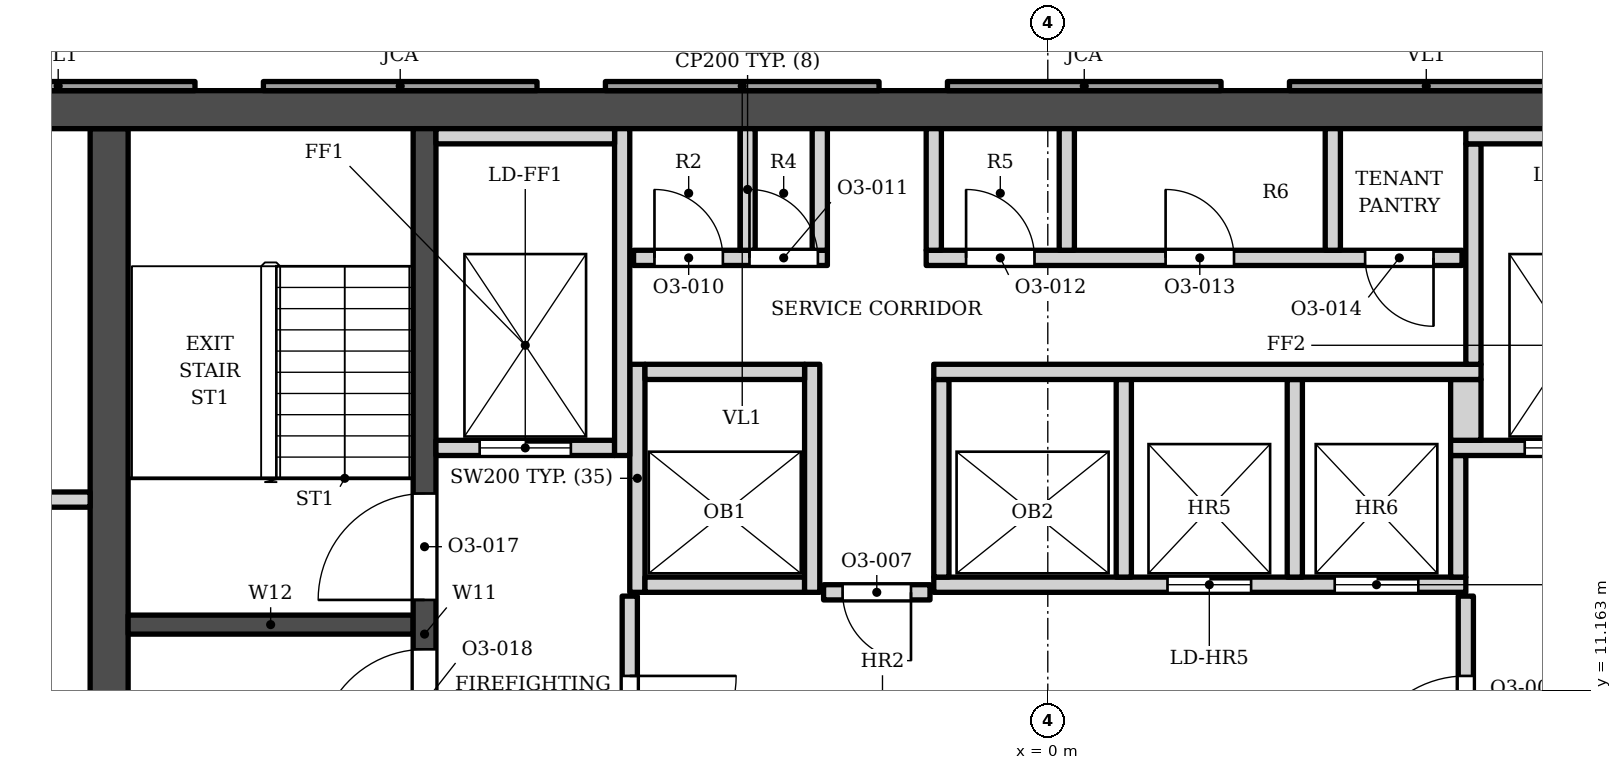
"""IFC4 building model, lengths in metres.
Left out: names, types, materials, properties, quantities, classifications, styles, units other than length and angle.
Written with IfcOpenShell. Run it as: python <this file> out.ifc"""

import sys

from ifc_helpers import new_model, si_unit, direction, frame, frame_2d, origin, place, context, subcontext, project, spatial, polyline, rectangle, outline, extrude, element, fill, save


model = new_model("IFC4")
c1 = context("Model", 3, precision=1e-05, world=origin(), true_north=direction((0.0, 1.0)))
c2 = subcontext(c1, "Body", "Model", "MODEL_VIEW")
j1 = project(units=[si_unit("LENGTHUNIT", "METRE"), si_unit("PLANEANGLEUNIT", "RADIAN")], contexts=[c1])
p1 = place(None, origin())
s1 = spatial("IfcSite", under=j1, at=p1, CompositionType="ELEMENT")
p2 = place(p1, origin())
s2 = spatial("IfcBuilding", under=s1, at=p2, CompositionType="ELEMENT")
p3 = place(p2, frame((0.0, 0.0, 168.0)))
s3 = spatial("IfcBuildingStorey", under=s2, at=p3, CompositionType="ELEMENT", Elevation=168.0)
p4 = place(p3, frame((-15.1, 18.802, 0.0), z_axis=(0.0, 0.0, 1.0), x_axis=(1.0, 0.0, 0.0)))
e1 = element("IfcWall", 1, at=p4, inside=s3, PredefinedType="SHEAR", context=c2, shape_type="SweptSolid", body=[
    extrude(rectangle(XDim=30.2, YDim=0.5, at=frame_2d((15.1, 0.0))), origin(), (0.0, 0.0, 1.0), 3.9),
])
p5 = place(p3, frame((-12.35, 5.253, 0.0), z_axis=(0.0, 0.0, 1.0), x_axis=(0.0, 1.0, 0.0)))
e2 = element("IfcWall", 2, at=p5, inside=s3, PredefinedType="SHEAR", context=c2, shape_type="SweptSolid", body=[
    extrude(rectangle(XDim=13.3, YDim=0.5, at=frame_2d((6.65, 0.0))), origin(), (0.0, 0.0, 1.0), 3.9),
])
p6 = place(p3, frame((-8.2, 5.253, 0.0), z_axis=(0.0, 0.0, 1.0), x_axis=(0.0, 1.0, 0.0)))
e3 = element("IfcWall", 3, at=p6, inside=s3, PredefinedType="SHEAR", context=c2, shape_type="SweptSolid", body=[
    extrude(rectangle(XDim=13.3, YDim=0.3, at=frame_2d((6.65, 0.0))), origin(), (0.0, 0.0, 1.0), 3.9),
])
p7 = place(p6, frame((7.1, 0.0, 0.0)))
e4 = element("IfcOpeningElement", 4, at=p7, cuts=e3, PredefinedType="OPENING", context=c2, shape_type="SweptSolid", body=[
    extrude(rectangle(XDim=1.4, YDim=2.1, at=frame_2d((0.7, 1.05))), frame((0.0, 0.16, 0.0), z_axis=(0.0, -1.0, 0.0), x_axis=(1.0, 0.0, 0.0)), (0.0, 0.0, 1.0), 0.32),
])
p8 = place(p6, frame((5.05, 0.0, 0.0)))
e5 = element("IfcOpeningElement", 5, at=p8, cuts=e3, PredefinedType="OPENING", context=c2, shape_type="SweptSolid", body=[
    extrude(rectangle(XDim=1.4, YDim=2.1, at=frame_2d((0.7, 1.05))), frame((0.0, 0.16, 0.0), z_axis=(0.0, -1.0, 0.0), x_axis=(1.0, 0.0, 0.0)), (0.0, 0.0, 1.0), 0.32),
])
p9 = place(p3, frame((-12.1, 12.028, 0.0), z_axis=(0.0, 0.0, 1.0), x_axis=(1.0, 0.0, 0.0)))
e6 = element("IfcWall", 6, at=p9, inside=s3, PredefinedType="SHEAR", context=c2, shape_type="SweptSolid", body=[
    extrude(rectangle(XDim=3.75, YDim=0.25, at=frame_2d((1.875, 0.0))), origin(), (0.0, 0.0, 1.0), 3.9),
])
p10 = place(p3, origin())
e7 = element("IfcWall", 7, at=p10, inside=s3, PredefinedType="ELEMENTEDWALL", context=c2, shape_type="SweptSolid", body=[
    extrude(outline(polyline([(3.18, 19.173), (3.18, 19.052), (6.78, 19.052), (6.78, 19.173), (3.18, 19.173)])), origin(), (0.0, 0.0, 1.0), 3.0),
])
p11 = place(p3, origin())
e8 = element("IfcWall", 8, at=p11, inside=s3, PredefinedType="SOLIDWALL", context=c2, shape_type="SweptSolid", body=[
    extrude(outline(polyline([(-1.32, 19.173), (-1.32, 19.052), (2.28, 19.052), (2.28, 19.173), (-1.32, 19.173)])), origin(), (0.0, 0.0, 1.0), 3.0),
])
p12 = place(p3, origin())
e9 = element("IfcWall", 9, at=p12, inside=s3, PredefinedType="ELEMENTEDWALL", context=c2, shape_type="SweptSolid", body=[
    extrude(outline(polyline([(-5.82, 19.173), (-5.82, 19.052), (-2.22, 19.052), (-2.22, 19.173), (-5.82, 19.173)])), origin(), (0.0, 0.0, 1.0), 3.0),
])
p13 = place(p3, origin())
e10 = element("IfcWall", 10, at=p13, inside=s3, PredefinedType="SOLIDWALL", context=c2, shape_type="SweptSolid", body=[
    extrude(outline(polyline([(-10.32, 19.173), (-10.32, 19.052), (-6.72, 19.052), (-6.72, 19.173), (-10.32, 19.173)])), origin(), (0.0, 0.0, 1.0), 3.0),
])
p14 = place(p3, origin())
e11 = element("IfcWall", 11, at=p14, inside=s3, PredefinedType="ELEMENTEDWALL", context=c2, shape_type="SweptSolid", body=[
    extrude(outline(polyline([(-14.82, 19.173), (-14.82, 19.052), (-11.22, 19.052), (-11.22, 19.173), (-14.82, 19.173)])), origin(), (0.0, 0.0, 1.0), 3.0),
])
p15 = place(p3, frame((-5.5, 9.103, 0.0), z_axis=(0.0, 0.0, 1.0), x_axis=(0.0, 1.0, 0.0)))
e12 = element("IfcWall", 12, at=p15, inside=s3, PredefinedType="SOLIDWALL", context=c2, shape_type="SweptSolid", body=[
    extrude(rectangle(XDim=3.3, YDim=0.2, at=frame_2d((1.65, 0.0))), origin(), (0.0, 0.0, 1.0), 3.73),
])
p16 = place(p15, frame((0.85, 0.0, 0.0)))
e13 = element("IfcOpeningElement", 13, at=p16, cuts=e12, PredefinedType="OPENING", context=c2, shape_type="SweptSolid", body=[
    extrude(rectangle(XDim=1.4, YDim=2.1, at=frame_2d((0.7, 1.05))), frame((0.0, 0.11, 0.0), z_axis=(0.0, -1.0, 0.0), x_axis=(1.0, 0.0, 0.0)), (0.0, 0.0, 1.0), 0.22),
])
p17 = place(p3, frame((5.5, 9.103, 0.0), z_axis=(0.0, 0.0, 1.0), x_axis=(0.0, 1.0, 0.0)))
e14 = element("IfcWall", 14, at=p17, inside=s3, PredefinedType="SOLIDWALL", context=c2, shape_type="SweptSolid", body=[
    extrude(rectangle(XDim=3.3, YDim=0.2, at=frame_2d((1.65, 0.0))), origin(), (0.0, 0.0, 1.0), 3.73),
])
p18 = place(p17, frame((0.85, 0.0, 0.0)))
e15 = element("IfcOpeningElement", 15, at=p18, cuts=e14, PredefinedType="OPENING", context=c2, shape_type="SweptSolid", body=[
    extrude(rectangle(XDim=1.4, YDim=2.1, at=frame_2d((0.7, 1.05))), frame((0.0, 0.11, 0.0), z_axis=(0.0, -1.0, 0.0), x_axis=(1.0, 0.0, 0.0)), (0.0, 0.0, 1.0), 0.22),
])
p19 = place(p3, frame((-2.95, 12.453, 0.0), z_axis=(0.0, 0.0, 1.0), x_axis=(1.0, 0.0, 0.0)))
e16 = element("IfcWall", 16, at=p19, inside=s3, PredefinedType="SOLIDWALL", context=c2, shape_type="SweptSolid", body=[
    extrude(rectangle(XDim=1.4, YDim=0.2, at=frame_2d((0.7, 0.0))), origin(), (0.0, 0.0, 1.0), 3.73),
])
p20 = place(p19, frame((0.25, 0.0, 0.0)))
e17 = element("IfcOpeningElement", 17, at=p20, cuts=e16, PredefinedType="OPENING", context=c2, shape_type="SweptSolid", body=[
    extrude(rectangle(XDim=0.9, YDim=2.1, at=frame_2d((0.45, 1.05))), frame((0.0, 0.11, 0.0), z_axis=(0.0, -1.0, 0.0), x_axis=(1.0, 0.0, 0.0)), (0.0, 0.0, 1.0), 0.22),
])
p21 = place(p3, frame((-5.4, 12.453, 0.0), z_axis=(0.0, 0.0, 1.0), x_axis=(0.0, 1.0, 0.0)))
e18 = element("IfcWall", 18, at=p21, inside=s3, PredefinedType="SOLIDWALL", context=c2, shape_type="SweptSolid", body=[
    extrude(rectangle(XDim=3.0, YDim=0.2, at=frame_2d((1.5, 0.0))), origin(), (0.0, 0.0, 1.0), 3.73),
])
p22 = place(p3, frame((-5.3, 12.552, 0.0), z_axis=(0.0, 0.0, 1.0), x_axis=(1.0, 0.0, 0.0)))
e19 = element("IfcWall", 19, at=p22, inside=s3, PredefinedType="SOLIDWALL", context=c2, shape_type="SweptSolid", body=[
    extrude(rectangle(XDim=2.1, YDim=0.2, at=frame_2d((1.05, 0.0))), origin(), (0.0, 0.0, 1.0), 3.73),
])
p23 = place(p3, frame((-3.1, 12.453, 0.0), z_axis=(0.0, 0.0, 1.0), x_axis=(0.0, 1.0, 0.0)))
e20 = element("IfcWall", 20, at=p23, inside=s3, PredefinedType="SOLIDWALL", context=c2, shape_type="SweptSolid", body=[
    extrude(rectangle(XDim=3.0, YDim=0.2, at=frame_2d((1.5, 0.0))), origin(), (0.0, 0.0, 1.0), 3.73),
])
p24 = place(p3, frame((-1.5, 12.552, 0.0), z_axis=(0.0, 0.0, 1.0), x_axis=(1.0, 0.0, 0.0)))
e21 = element("IfcWall", 21, at=p24, inside=s3, PredefinedType="SOLIDWALL", context=c2, shape_type="SweptSolid", body=[
    extrude(rectangle(XDim=7.0, YDim=0.2, at=frame_2d((3.5, 0.0))), origin(), (0.0, 0.0, 1.0), 3.73),
])
p25 = place(p24, frame((3.075, 0.0, 0.0)))
e22 = element("IfcOpeningElement", 22, at=p25, cuts=e21, PredefinedType="OPENING", context=c2, shape_type="SweptSolid", body=[
    extrude(rectangle(XDim=1.1, YDim=2.1, at=frame_2d((0.55, 1.05))), frame((0.0, 0.11, 0.0), z_axis=(0.0, -1.0, 0.0), x_axis=(1.0, 0.0, 0.0)), (0.0, 0.0, 1.0), 0.22),
])
p26 = place(p24, frame((5.275, 0.0, 0.0)))
e23 = element("IfcOpeningElement", 23, at=p26, cuts=e21, PredefinedType="OPENING", context=c2, shape_type="SweptSolid", body=[
    extrude(rectangle(XDim=1.1, YDim=2.1, at=frame_2d((0.55, 1.05))), frame((0.0, 0.11, 0.0), z_axis=(0.0, -1.0, 0.0), x_axis=(1.0, 0.0, 0.0)), (0.0, 0.0, 1.0), 0.22),
])
for number, where, z_axis, x_axis in (
    (24, (-1.4, 12.653, 0.0), (0.0, 0.0, 1.0), (0.0, 1.0, 0.0)),
    (25, (1.0, 12.653, 0.0), (0.0, 0.0, 1.0), (0.0, 1.0, 0.0)),
    (26, (3.25, 12.653, 0.0), (0.0, 0.0, 1.0), (0.0, 1.0, 0.0)),
):
    element("IfcWall", number, at=place(p3, frame(where, z_axis=z_axis, x_axis=x_axis)), inside=s3, PredefinedType="SOLIDWALL", context=c2, shape_type="SweptSolid", body=[
        extrude(rectangle(XDim=2.6, YDim=0.2, at=frame_2d((1.3, 0.0))), origin(), (0.0, 0.0, 1.0), 3.73),
    ])
p27 = place(p3, frame((5.4, 12.653, 0.0), z_axis=(0.0, 0.0, 1.0), x_axis=(0.0, 1.0, 0.0)))
e27 = element("IfcWall", 27, at=p27, inside=s3, PredefinedType="SOLIDWALL", context=c2, shape_type="SweptSolid", body=[
    extrude(rectangle(XDim=1.6, YDim=0.2, at=frame_2d((0.8, 0.0))), origin(), (0.0, 0.0, 1.0), 3.73),
])
p28 = place(p3, frame((-15.1, 13.673, 0.0), z_axis=(0.0, 0.0, 1.0), x_axis=(1.0, 0.0, 0.0)))
e28 = element("IfcWall", 28, at=p28, inside=s3, PredefinedType="PARTITIONING", context=c2, shape_type="SweptSolid", body=[
    extrude(rectangle(XDim=2.5, YDim=0.2, at=frame_2d((1.25, 0.0))), origin(), (0.0, 0.0, 1.0), 3.73),
])
p29 = place(p3, frame((-8.05, 14.353, 0.0), z_axis=(0.0, 0.0, 1.0), x_axis=(1.0, 0.0, 0.0)))
e29 = element("IfcWall", 29, at=p29, inside=s3, PredefinedType="SOLIDWALL", context=c2, shape_type="SweptSolid", body=[
    extrude(rectangle(XDim=2.35, YDim=0.2, at=frame_2d((1.175, 0.0))), origin(), (0.0, 0.0, 1.0), 3.73),
])
p30 = place(p29, frame((0.575, 0.0, 0.0)))
e30 = element("IfcOpeningElement", 30, at=p30, cuts=e29, PredefinedType="OPENING", context=c2, shape_type="SweptSolid", body=[
    extrude(rectangle(XDim=1.2, YDim=2.1, at=frame_2d((0.6, 1.05))), frame((0.0, 0.11, 0.0), z_axis=(0.0, -1.0, 0.0), x_axis=(1.0, 0.0, 0.0)), (0.0, 0.0, 1.0), 0.22),
])
p31 = place(p3, frame((-5.6, 14.253, 0.0), z_axis=(0.0, 0.0, 1.0), x_axis=(0.0, 1.0, 0.0)))
e31 = element("IfcWall", 31, at=p31, inside=s3, PredefinedType="SOLIDWALL", context=c2, shape_type="SweptSolid", body=[
    extrude(rectangle(XDim=4.3, YDim=0.2, at=frame_2d((2.15, 0.0))), origin(), (0.0, 0.0, 1.0), 3.73),
])
p32 = place(p3, frame((5.3, 14.353, 0.0), z_axis=(0.0, 0.0, 1.0), x_axis=(1.0, 0.0, 0.0)))
e32 = element("IfcWall", 32, at=p32, inside=s3, PredefinedType="SOLIDWALL", context=c2, shape_type="SweptSolid", body=[
    extrude(rectangle(XDim=2.75, YDim=0.2, at=frame_2d((1.375, 0.0))), origin(), (0.0, 0.0, 1.0), 3.73),
])
p33 = place(p32, frame((0.975, 0.0, 0.0)))
e33 = element("IfcOpeningElement", 33, at=p33, cuts=e32, PredefinedType="OPENING", context=c2, shape_type="SweptSolid", body=[
    extrude(rectangle(XDim=1.2, YDim=2.1, at=frame_2d((0.6, 1.05))), frame((0.0, 0.11, 0.0), z_axis=(0.0, -1.0, 0.0), x_axis=(1.0, 0.0, 0.0)), (0.0, 0.0, 1.0), 0.22),
])
p34 = place(p3, frame((5.5, 14.453, 0.0), z_axis=(0.0, 0.0, 1.0), x_axis=(0.0, 1.0, 0.0)))
e34 = element("IfcWall", 34, at=p34, inside=s3, PredefinedType="SOLIDWALL", context=c2, shape_type="SweptSolid", body=[
    extrude(rectangle(XDim=0.8, YDim=0.4, at=frame_2d((0.4, 0.0))), origin(), (0.0, 0.0, 1.0), 3.73),
])
p35 = place(p3, frame((-5.3, 15.353, 0.0), z_axis=(0.0, 0.0, 1.0), x_axis=(1.0, 0.0, 0.0)))
e35 = element("IfcWall", 35, at=p35, inside=s3, PredefinedType="SOLIDWALL", context=c2, shape_type="SweptSolid", body=[
    extrude(rectangle(XDim=2.1, YDim=0.2, at=frame_2d((1.05, 0.0))), origin(), (0.0, 0.0, 1.0), 3.73),
])
p36 = place(p3, frame((-1.5, 15.353, 0.0), z_axis=(0.0, 0.0, 1.0), x_axis=(1.0, 0.0, 0.0)))
e36 = element("IfcWall", 36, at=p36, inside=s3, PredefinedType="SOLIDWALL", context=c2, shape_type="SweptSolid", body=[
    extrude(rectangle(XDim=7.2, YDim=0.2, at=frame_2d((3.6, 0.0))), origin(), (0.0, 0.0, 1.0), 3.73),
])
p37 = place(p3, frame((5.6, 15.453, 0.0), z_axis=(0.0, 0.0, 1.0), x_axis=(0.0, 1.0, 0.0)))
e37 = element("IfcWall", 37, at=p37, inside=s3, PredefinedType="SOLIDWALL", context=c2, shape_type="SweptSolid", body=[
    extrude(rectangle(XDim=2.9, YDim=0.2, at=frame_2d((1.45, 0.0))), origin(), (0.0, 0.0, 1.0), 3.73),
])
p38 = place(p3, frame((-5.45, 16.853, 0.0), z_axis=(0.0, 0.0, 1.0), x_axis=(1.0, 0.0, 0.0)))
e38 = element("IfcWall", 38, at=p38, inside=s3, PredefinedType="SOLIDWALL", context=c2, shape_type="SweptSolid", body=[
    extrude(rectangle(XDim=2.55, YDim=0.2, at=frame_2d((1.275, 0.0))), origin(), (0.0, 0.0, 1.0), 3.73),
])
p39 = place(p38, frame((0.275, 0.0, 0.0)))
e39 = element("IfcOpeningElement", 39, at=p39, cuts=e38, PredefinedType="OPENING", context=c2, shape_type="SweptSolid", body=[
    extrude(rectangle(XDim=0.9, YDim=2.1, at=frame_2d((0.45, 1.05))), frame((0.0, 0.11, 0.0), z_axis=(0.0, -1.0, 0.0), x_axis=(1.0, 0.0, 0.0)), (0.0, 0.0, 1.0), 0.22),
])
p40 = place(p38, frame((1.525, 0.0, 0.0)))
e40 = element("IfcOpeningElement", 40, at=p40, cuts=e38, PredefinedType="OPENING", context=c2, shape_type="SweptSolid", body=[
    extrude(rectangle(XDim=0.9, YDim=2.1, at=frame_2d((0.45, 1.05))), frame((0.0, 0.11, 0.0), z_axis=(0.0, -1.0, 0.0), x_axis=(1.0, 0.0, 0.0)), (0.0, 0.0, 1.0), 0.22),
])
p41 = place(p3, frame((-1.6, 16.853, 0.0), z_axis=(0.0, 0.0, 1.0), x_axis=(1.0, 0.0, 0.0)))
e41 = element("IfcWall", 41, at=p41, inside=s3, PredefinedType="SOLIDWALL", context=c2, shape_type="SweptSolid", body=[
    extrude(rectangle(XDim=7.05, YDim=0.2, at=frame_2d((3.525, 0.0))), origin(), (0.0, 0.0, 1.0), 3.73),
])
p42 = place(p41, frame((0.525, 0.0, 0.0)))
e42 = element("IfcOpeningElement", 42, at=p42, cuts=e41, PredefinedType="OPENING", context=c2, shape_type="SweptSolid", body=[
    extrude(rectangle(XDim=0.9, YDim=2.1, at=frame_2d((0.45, 1.05))), frame((0.0, 0.11, 0.0), z_axis=(0.0, -1.0, 0.0), x_axis=(1.0, 0.0, 0.0)), (0.0, 0.0, 1.0), 0.22),
])
p43 = place(p41, frame((3.15, 0.0, 0.0)))
e43 = element("IfcOpeningElement", 43, at=p43, cuts=e41, PredefinedType="OPENING", context=c2, shape_type="SweptSolid", body=[
    extrude(rectangle(XDim=0.9, YDim=2.1, at=frame_2d((0.45, 1.05))), frame((0.0, 0.11, 0.0), z_axis=(0.0, -1.0, 0.0), x_axis=(1.0, 0.0, 0.0)), (0.0, 0.0, 1.0), 0.22),
])
p44 = place(p41, frame((5.775, 0.0, 0.0)))
e44 = element("IfcOpeningElement", 44, at=p44, cuts=e41, PredefinedType="OPENING", context=c2, shape_type="SweptSolid", body=[
    extrude(rectangle(XDim=0.9, YDim=2.1, at=frame_2d((0.45, 1.05))), frame((0.0, 0.11, 0.0), z_axis=(0.0, -1.0, 0.0), x_axis=(1.0, 0.0, 0.0)), (0.0, 0.0, 1.0), 0.22),
])
for number, where, z_axis, x_axis in (
    (45, (-3.95, 16.953, 0.0), (0.0, 0.0, 1.0), (0.0, 1.0, 0.0)),
    (46, (-3.0, 16.953, 0.0), (0.0, 0.0, 1.0), (0.0, 1.0, 0.0)),
    (47, (-1.5, 16.953, 0.0), (0.0, 0.0, 1.0), (0.0, 1.0, 0.0)),
    (48, (0.25, 16.953, 0.0), (0.0, 0.0, 1.0), (0.0, 1.0, 0.0)),
    (49, (3.75, 16.953, 0.0), (0.0, 0.0, 1.0), (0.0, 1.0, 0.0)),
):
    element("IfcWall", number, at=place(p3, frame(where, z_axis=z_axis, x_axis=x_axis)), inside=s3, PredefinedType="PARTITIONING", context=c2, shape_type="SweptSolid", body=[
        extrude(rectangle(XDim=1.6, YDim=0.2, at=frame_2d((0.8, 0.0))), origin(), (0.0, 0.0, 1.0), 3.73),
    ])
p45 = place(p3, frame((-8.05, 18.453, 0.0), z_axis=(0.0, 0.0, 1.0), x_axis=(1.0, 0.0, 0.0)))
e50 = element("IfcWall", 50, at=p45, inside=s3, PredefinedType="SOLIDWALL", context=c2, shape_type="SweptSolid", body=[
    extrude(rectangle(XDim=2.35, YDim=0.2, at=frame_2d((1.175, 0.0))), origin(), (0.0, 0.0, 1.0), 3.73),
])
p46 = place(p3, frame((5.5, 18.453, 0.0), z_axis=(0.0, 0.0, 1.0), x_axis=(1.0, 0.0, 0.0)))
e51 = element("IfcWall", 51, at=p46, inside=s3, PredefinedType="SOLIDWALL", context=c2, shape_type="SweptSolid", body=[
    extrude(rectangle(XDim=2.55, YDim=0.2, at=frame_2d((1.275, 0.0))), origin(), (0.0, 0.0, 1.0), 3.73),
])
p47 = place(p25, origin())
e52 = element("IfcDoor", 52, at=p47, inside=s3, OperationType="DOUBLE_DOOR_SLIDING", PredefinedType="DOOR", context=c2, shape_type="SweptSolid", body=[
    extrude(rectangle(XDim=1.1, YDim=2.1, at=frame_2d((0.55, 1.05))), frame((0.0, 0.025, 0.0), z_axis=(0.0, -1.0, 0.0), x_axis=(1.0, 0.0, 0.0)), (0.0, 0.0, 1.0), 0.05),
])
fill(e22, e52)
p48 = place(p26, origin())
e53 = element("IfcDoor", 53, at=p48, inside=s3, OperationType="DOUBLE_DOOR_SLIDING", PredefinedType="DOOR", context=c2, shape_type="SweptSolid", body=[
    extrude(rectangle(XDim=1.1, YDim=2.1, at=frame_2d((0.55, 1.05))), frame((0.0, 0.025, 0.0), z_axis=(0.0, -1.0, 0.0), x_axis=(1.0, 0.0, 0.0)), (0.0, 0.0, 1.0), 0.05),
])
fill(e23, e53)
p49 = place(p30, origin())
e54 = element("IfcDoor", 54, at=p49, inside=s3, OperationType="DOUBLE_DOOR_SLIDING", PredefinedType="DOOR", context=c2, shape_type="SweptSolid", body=[
    extrude(rectangle(XDim=1.2, YDim=2.1, at=frame_2d((0.6, 1.05))), frame((0.0, 0.025, 0.0), z_axis=(0.0, -1.0, 0.0), x_axis=(1.0, 0.0, 0.0)), (0.0, 0.0, 1.0), 0.05),
])
fill(e30, e54)
p50 = place(p33, origin())
e55 = element("IfcDoor", 55, at=p50, inside=s3, OperationType="DOUBLE_DOOR_SLIDING", PredefinedType="DOOR", context=c2, shape_type="SweptSolid", body=[
    extrude(rectangle(XDim=1.2, YDim=2.1, at=frame_2d((0.6, 1.05))), frame((0.0, 0.025, 0.0), z_axis=(0.0, -1.0, 0.0), x_axis=(1.0, 0.0, 0.0)), (0.0, 0.0, 1.0), 0.05),
])
fill(e33, e55)
p51 = place(p7, origin())
e56 = element("IfcDoor", 56, at=p51, inside=s3, OperationType="SINGLE_SWING_LEFT", PredefinedType="DOOR", context=c2, shape_type="SweptSolid", body=[
    extrude(rectangle(XDim=1.4, YDim=2.1, at=frame_2d((0.7, 1.05))), frame((0.0, 0.025, 0.0), z_axis=(0.0, -1.0, 0.0), x_axis=(1.0, 0.0, 0.0)), (0.0, 0.0, 1.0), 0.05),
])
fill(e4, e56)
p52 = place(p8, origin())
e57 = element("IfcDoor", 57, at=p52, inside=s3, OperationType="SINGLE_SWING_LEFT", PredefinedType="DOOR", context=c2, shape_type="SweptSolid", body=[
    extrude(rectangle(XDim=1.4, YDim=2.1, at=frame_2d((0.7, 1.05))), frame((0.0, 0.025, 0.0), z_axis=(0.0, -1.0, 0.0), x_axis=(1.0, 0.0, 0.0)), (0.0, 0.0, 1.0), 0.05),
])
fill(e5, e57)
p53 = place(p20, origin())
e58 = element("IfcDoor", 58, at=p53, inside=s3, OperationType="SINGLE_SWING_RIGHT", PredefinedType="DOOR", context=c2, shape_type="SweptSolid", body=[
    extrude(rectangle(XDim=0.9, YDim=2.1, at=frame_2d((0.45, 1.05))), frame((0.0, 0.025, 0.0), z_axis=(0.0, -1.0, 0.0), x_axis=(1.0, 0.0, 0.0)), (0.0, 0.0, 1.0), 0.05),
])
fill(e17, e58)
p54 = place(p16, origin())
e59 = element("IfcDoor", 59, at=p54, inside=s3, OperationType="SINGLE_SWING_RIGHT", PredefinedType="DOOR", context=c2, shape_type="SweptSolid", body=[
    extrude(rectangle(XDim=1.4, YDim=2.1, at=frame_2d((0.7, 1.05))), frame((0.0, 0.025, 0.0), z_axis=(0.0, -1.0, 0.0), x_axis=(1.0, 0.0, 0.0)), (0.0, 0.0, 1.0), 0.05),
])
fill(e13, e59)
p55 = place(p18, origin())
e60 = element("IfcDoor", 60, at=p55, inside=s3, OperationType="SINGLE_SWING_LEFT", PredefinedType="DOOR", context=c2, shape_type="SweptSolid", body=[
    extrude(rectangle(XDim=1.4, YDim=2.1, at=frame_2d((0.7, 1.05))), frame((0.0, 0.025, 0.0), z_axis=(0.0, -1.0, 0.0), x_axis=(1.0, 0.0, 0.0)), (0.0, 0.0, 1.0), 0.05),
])
fill(e15, e60)
p56 = place(p39, origin())
e61 = element("IfcDoor", 61, at=p56, inside=s3, OperationType="SINGLE_SWING_LEFT", PredefinedType="DOOR", context=c2, shape_type="SweptSolid", body=[
    extrude(rectangle(XDim=0.9, YDim=2.1, at=frame_2d((0.45, 1.05))), frame((0.0, 0.025, 0.0), z_axis=(0.0, -1.0, 0.0), x_axis=(1.0, 0.0, 0.0)), (0.0, 0.0, 1.0), 0.05),
])
fill(e39, e61)
p57 = place(p40, origin())
e62 = element("IfcDoor", 62, at=p57, inside=s3, OperationType="SINGLE_SWING_LEFT", PredefinedType="DOOR", context=c2, shape_type="SweptSolid", body=[
    extrude(rectangle(XDim=0.9, YDim=2.1, at=frame_2d((0.45, 1.05))), frame((0.0, 0.025, 0.0), z_axis=(0.0, -1.0, 0.0), x_axis=(1.0, 0.0, 0.0)), (0.0, 0.0, 1.0), 0.05),
])
fill(e40, e62)
p58 = place(p42, origin())
e63 = element("IfcDoor", 63, at=p58, inside=s3, OperationType="SINGLE_SWING_LEFT", PredefinedType="DOOR", context=c2, shape_type="SweptSolid", body=[
    extrude(rectangle(XDim=0.9, YDim=2.1, at=frame_2d((0.45, 1.05))), frame((0.0, 0.025, 0.0), z_axis=(0.0, -1.0, 0.0), x_axis=(1.0, 0.0, 0.0)), (0.0, 0.0, 1.0), 0.05),
])
fill(e42, e63)
p59 = place(p43, origin())
e64 = element("IfcDoor", 64, at=p59, inside=s3, OperationType="SINGLE_SWING_LEFT", PredefinedType="DOOR", context=c2, shape_type="SweptSolid", body=[
    extrude(rectangle(XDim=0.9, YDim=2.1, at=frame_2d((0.45, 1.05))), frame((0.0, 0.025, 0.0), z_axis=(0.0, -1.0, 0.0), x_axis=(1.0, 0.0, 0.0)), (0.0, 0.0, 1.0), 0.05),
])
fill(e43, e64)
p60 = place(p44, origin())
e65 = element("IfcDoor", 65, at=p60, inside=s3, OperationType="SINGLE_SWING_RIGHT", PredefinedType="DOOR", context=c2, shape_type="SweptSolid", body=[
    extrude(rectangle(XDim=0.9, YDim=2.1, at=frame_2d((0.45, 1.05))), frame((0.0, 0.025, 0.0), z_axis=(0.0, -1.0, 0.0), x_axis=(1.0, 0.0, 0.0)), (0.0, 0.0, 1.0), 0.05),
])
fill(e44, e65)
save(model, sys.argv[1])
